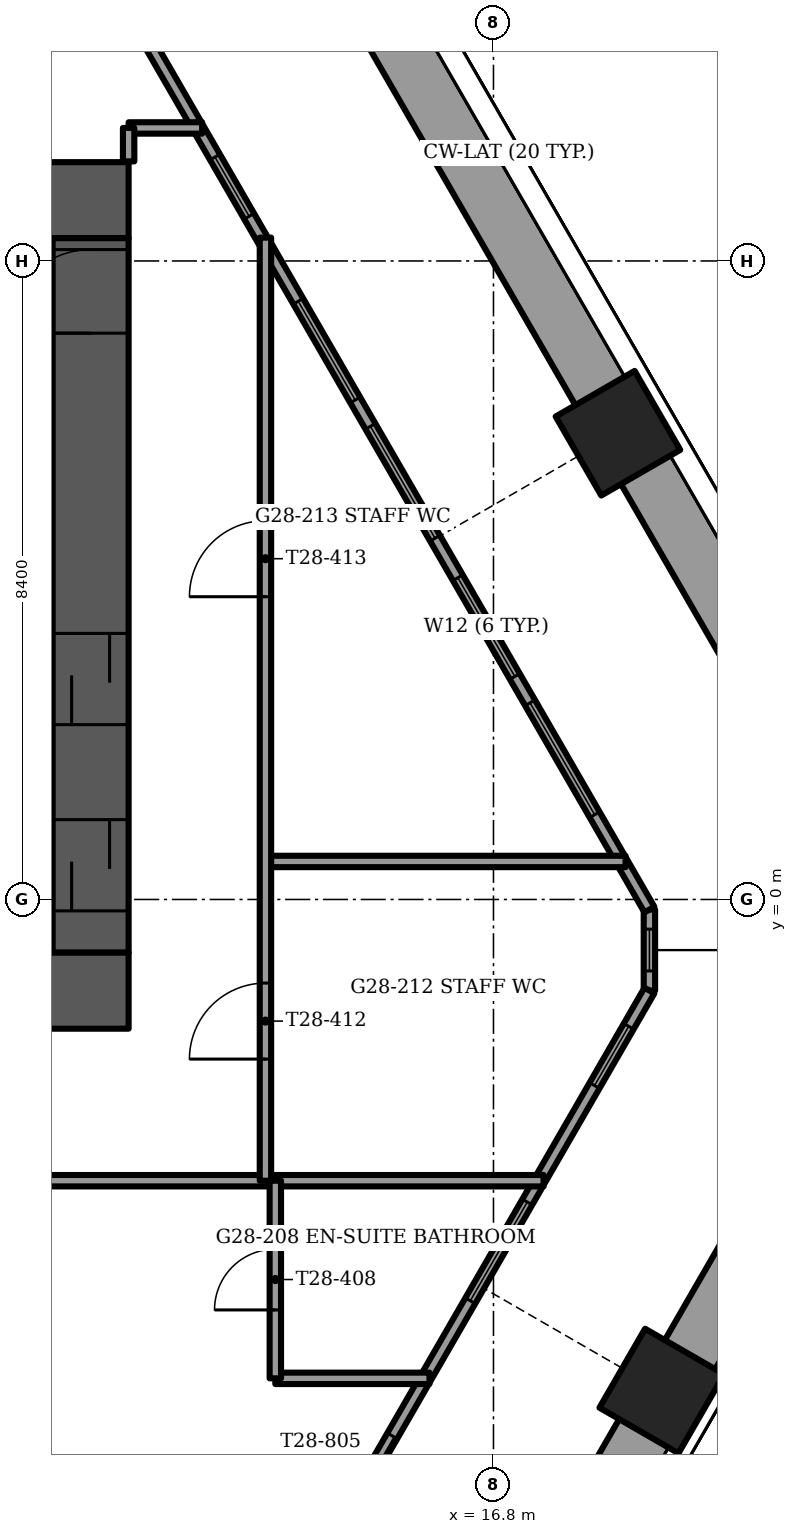
"""IFC4 building model, lengths in metres.
Left out: names, types, materials, properties, quantities, classifications, styles, units other than length and angle.
Written with IfcOpenShell. Run it as: python <this file> out.ifc"""

import sys

from ifc_helpers import new_model, si_unit, direction, frame, frame_2d, origin, origin_2d, place, context, subcontext, project, spatial, rectangle, extrude, element, fill, save


model = new_model("IFC4")
c1 = context("Model", 3, precision=1e-05, world=origin(), true_north=direction((0.0, 1.0)))
c2 = subcontext(c1, "Body", "Model", "MODEL_VIEW")
j1 = project(units=[si_unit("LENGTHUNIT", "METRE"), si_unit("PLANEANGLEUNIT", "RADIAN")], contexts=[c1])
p1 = place(None, origin())
s1 = spatial("IfcSite", under=j1, at=p1, CompositionType="ELEMENT")
p2 = place(p1, origin())
s2 = spatial("IfcBuilding", under=s1, at=p2, CompositionType="ELEMENT")
p3 = place(p2, frame((0.0, 0.0, 116.0)))
s3 = spatial("IfcBuildingStorey", under=s2, at=p3, CompositionType="ELEMENT", Elevation=116.0)
for number, where, z_axis, x_axis in (
    (1, (19.014, -6.467, -1.2), (0.0, 0.0, 1.0), (-0.5, -0.866, 0.0)),
    (2, (18.438, 6.134, -1.2), (0.0, 0.0, 1.0), (0.5, -0.866, 0.0)),
):
    element("IfcColumn", number, at=place(p3, frame(where, z_axis=z_axis, x_axis=x_axis)), inside=s3, PredefinedType="COLUMN", context=c2, shape_type="SweptSolid", body=[
        extrude(rectangle(XDim=1.2, YDim=1.2, at=origin_2d()), origin(), (0.0, 0.0, 1.0), 3.75),
    ])
p4 = place(p3, frame((-12.0, -1.2, -0.3), z_axis=(0.0, 0.0, 1.0), x_axis=(1.0, 0.0, 0.0)))
e3 = element("IfcWall", 3, at=p4, inside=s3, PredefinedType="SHEAR", context=c2, shape_type="SweptSolid", body=[
    extrude(rectangle(XDim=24.0, YDim=1.0, at=frame_2d((12.0, 0.0))), origin(), (0.0, 0.0, 1.0), 3.75),
])
p5 = place(p4, frame((11.2, 0.0, 0.0)))
e4 = element("IfcOpeningElement", 4, at=p5, cuts=e3, PredefinedType="OPENING", context=c2, shape_type="SweptSolid", body=[
    extrude(rectangle(XDim=1.6, YDim=2.1, at=frame_2d((0.8, 1.05))), frame((0.0, 0.5, 0.0), z_axis=(0.0, -1.0, 0.0), x_axis=(1.0, 0.0, 0.0)), (0.0, 0.0, 1.0), 1.0),
])
p6 = place(p3, frame((-12.0, 9.2, -0.3), z_axis=(0.0, 0.0, 1.0), x_axis=(1.0, 0.0, 0.0)))
e5 = element("IfcWall", 5, at=p6, inside=s3, PredefinedType="SHEAR", context=c2, shape_type="SweptSolid", body=[
    extrude(rectangle(XDim=24.0, YDim=1.0, at=frame_2d((12.0, 0.0))), origin(), (0.0, 0.0, 1.0), 3.75),
])
p7 = place(p6, frame((11.2, 0.0, 0.0)))
e6 = element("IfcOpeningElement", 6, at=p7, cuts=e5, PredefinedType="OPENING", context=c2, shape_type="SweptSolid", body=[
    extrude(rectangle(XDim=1.6, YDim=2.1, at=frame_2d((0.8, 1.05))), frame((0.0, 0.5, 0.0), z_axis=(0.0, -1.0, 0.0), x_axis=(1.0, 0.0, 0.0)), (0.0, 0.0, 1.0), 1.0),
])
p8 = place(p6, frame((5.25, 0.0, 0.0)))
e7 = element("IfcOpeningElement", 7, at=p8, cuts=e5, PredefinedType="OPENING", context=c2, shape_type="SweptSolid", body=[
    extrude(rectangle(XDim=1.1, YDim=2.1, at=frame_2d((0.55, 1.05))), frame((0.0, 0.5, 0.0), z_axis=(0.0, -1.0, 0.0), x_axis=(1.0, 0.0, 0.0)), (0.0, 0.0, 1.0), 1.0),
])
p9 = place(p6, frame((17.65, 0.0, 0.0)))
e8 = element("IfcOpeningElement", 8, at=p9, cuts=e5, PredefinedType="OPENING", context=c2, shape_type="SweptSolid", body=[
    extrude(rectangle(XDim=1.1, YDim=2.1, at=frame_2d((0.55, 1.05))), frame((0.0, 0.5, 0.0), z_axis=(0.0, -1.0, 0.0), x_axis=(1.0, 0.0, 0.0)), (0.0, 0.0, 1.0), 1.0),
])
p10 = place(p3, frame((11.5, -0.7, -0.3), z_axis=(0.0, 0.0, 1.0), x_axis=(0.0, 1.0, 0.0)))
e9 = element("IfcWall", 9, at=p10, inside=s3, PredefinedType="SHEAR", context=c2, shape_type="SweptSolid", body=[
    extrude(rectangle(XDim=9.4, YDim=1.0, at=frame_2d((4.7, 0.0))), origin(), (0.0, 0.0, 1.0), 3.75),
])
p11 = place(p10, frame((8.15, 0.0, 0.0)))
e10 = element("IfcOpeningElement", 10, at=p11, cuts=e9, PredefinedType="OPENING", context=c2, shape_type="SweptSolid", body=[
    extrude(rectangle(XDim=1.1, YDim=2.1, at=frame_2d((0.55, 1.05))), frame((0.0, 0.5, 0.0), z_axis=(0.0, -1.0, 0.0), x_axis=(1.0, 0.0, 0.0)), (0.0, 0.0, 1.0), 1.0),
])
p12 = place(p10, frame((0.55, 0.0, 0.0)))
e11 = element("IfcOpeningElement", 11, at=p12, cuts=e9, PredefinedType="OPENING", context=c2, shape_type="SweptSolid", body=[
    extrude(rectangle(XDim=1.2, YDim=2.1, at=frame_2d((0.6, 1.05))), frame((0.0, 0.5, 0.0), z_axis=(0.0, -1.0, 0.0), x_axis=(1.0, 0.0, 0.0)), (0.0, 0.0, 1.0), 1.0),
])
p13 = place(p10, frame((3.0, 0.0, 0.0)))
e12 = element("IfcOpeningElement", 12, at=p13, cuts=e9, PredefinedType="OPENING", context=c2, shape_type="SweptSolid", body=[
    extrude(rectangle(XDim=1.2, YDim=2.1, at=frame_2d((0.6, 1.05))), frame((0.0, 0.5, 0.0), z_axis=(0.0, -1.0, 0.0), x_axis=(1.0, 0.0, 0.0)), (0.0, 0.0, 1.0), 1.0),
])
p14 = place(p3, frame((15.522, -12.815, 0.0), z_axis=(0.0, 0.0, 1.0), x_axis=(0.499999023957, 0.866025967302, 0.0)))
e13 = element("IfcWall", 13, at=p14, inside=s3, PredefinedType="PARAPET", context=c2, shape_type="SweptSolid", body=[
    extrude(rectangle(XDim=6.673, YDim=0.9, at=frame_2d((3.337, 0.0))), origin(), (0.0, 0.0, 1.0), 1.1),
])
p15 = place(p3, frame((19.429, -6.048, 0.0), z_axis=(0.0, 0.0, 1.0), x_axis=(0.49998957009, 0.866031425412, 0.0)))
e14 = element("IfcWall", 14, at=p15, inside=s3, PredefinedType="PARAPET", context=c2, shape_type="SweptSolid", body=[
    extrude(rectangle(XDim=5.564, YDim=0.9, at=frame_2d((2.782, 0.0))), origin(), (0.0, 0.0, 1.0), 1.1),
])
p16 = place(p3, frame((22.211, -0.102, 0.0), z_axis=(0.0, 0.0, 1.0), x_axis=(-0.500012951941, 0.866017925849, 0.0)))
e15 = element("IfcWall", 15, at=p16, inside=s3, PredefinedType="PARAPET", context=c2, shape_type="SweptSolid", body=[
    extrude(rectangle(XDim=6.717, YDim=0.9, at=frame_2d((3.358, 0.0))), origin(), (0.0, 0.0, 1.0), 1.1),
])
p17 = place(p3, frame((18.283, 6.702, 0.0), z_axis=(0.0, 0.0, 1.0), x_axis=(-0.50001062018, 0.866019272134, 0.0)))
e16 = element("IfcWall", 16, at=p17, inside=s3, PredefinedType="PARAPET", context=c2, shape_type="SweptSolid", body=[
    extrude(rectangle(XDim=6.674, YDim=0.9, at=frame_2d((3.337, 0.0))), origin(), (0.0, 0.0, 1.0), 1.1),
])
p18 = place(p3, frame((10.463, -15.727, 0.0), z_axis=(0.0, 0.0, 1.0), x_axis=(0.499992448691, 0.866029763491, 0.0)))
e17 = element("IfcWall", 17, at=p18, inside=s3, PredefinedType="SOLIDWALL", context=c2, shape_type="SweptSolid", body=[
    extrude(rectangle(XDim=16.777, YDim=0.15, at=frame_2d((8.388, 0.0))), origin(), (0.0, 0.0, 1.0), 3.45),
])
p19 = place(p18, frame((2.388, 0.0, 0.15)))
e18 = element("IfcOpeningElement", 18, at=p19, cuts=e17, PredefinedType="OPENING", context=c2, shape_type="SweptSolid", body=[
    extrude(rectangle(XDim=1.7, YDim=2.85, at=frame_2d((0.85, 1.425))), frame((0.0, 0.075, 0.0), z_axis=(0.0, -1.0, 0.0), x_axis=(1.0, 0.0, 0.0)), (0.0, 0.0, 1.0), 0.15),
])
p20 = place(p18, frame((4.488, 0.0, 0.0)))
e19 = element("IfcOpeningElement", 19, at=p20, cuts=e17, PredefinedType="OPENING", context=c2, shape_type="SweptSolid", body=[
    extrude(rectangle(XDim=1.5, YDim=2.4, at=frame_2d((0.75, 1.2))), frame((0.0, 0.075, 0.0), z_axis=(0.0, -1.0, 0.0), x_axis=(1.0, 0.0, 0.0)), (0.0, 0.0, 1.0), 0.15),
])
p21 = place(p18, frame((6.588, 0.0, 0.15)))
e20 = element("IfcOpeningElement", 20, at=p21, cuts=e17, PredefinedType="OPENING", context=c2, shape_type="SweptSolid", body=[
    extrude(rectangle(XDim=1.7, YDim=2.85, at=frame_2d((0.85, 1.425))), frame((0.0, 0.075, 0.0), z_axis=(0.0, -1.0, 0.0), x_axis=(1.0, 0.0, 0.0)), (0.0, 0.0, 1.0), 0.15),
])
p22 = place(p18, frame((8.511, 0.0, 0.0)))
e21 = element("IfcOpeningElement", 21, at=p22, cuts=e17, PredefinedType="OPENING", context=c2, shape_type="SweptSolid", body=[
    extrude(rectangle(XDim=1.5, YDim=2.4, at=frame_2d((0.75, 1.2))), frame((0.0, 0.075, 0.0), z_axis=(0.0, -1.0, 0.0), x_axis=(1.0, 0.0, 0.0)), (0.0, 0.0, 1.0), 0.15),
])
p23 = place(p18, frame((12.063, 0.0, 0.15)))
e22 = element("IfcOpeningElement", 22, at=p23, cuts=e17, PredefinedType="OPENING", context=c2, shape_type="SweptSolid", body=[
    extrude(rectangle(XDim=1.5, YDim=2.85, at=frame_2d((0.75, 1.425))), frame((0.0, 0.075, 0.0), z_axis=(0.0, -1.0, 0.0), x_axis=(1.0, 0.0, 0.0)), (0.0, 0.0, 1.0), 0.15),
])
p24 = place(p18, frame((0.544, 0.0, 0.15)))
e23 = element("IfcOpeningElement", 23, at=p24, cuts=e17, PredefinedType="OPENING", context=c2, shape_type="SweptSolid", body=[
    extrude(rectangle(XDim=0.9, YDim=2.73, at=frame_2d((0.45, 1.365))), frame((0.0, 0.075, 0.0), z_axis=(0.0, -1.0, 0.0), x_axis=(1.0, 0.0, 0.0)), (0.0, 0.0, 1.0), 0.15),
])
p25 = place(p18, frame((15.333, 0.0, 0.15)))
e24 = element("IfcOpeningElement", 24, at=p25, cuts=e17, PredefinedType="OPENING", context=c2, shape_type="SweptSolid", body=[
    extrude(rectangle(XDim=0.9, YDim=2.73, at=frame_2d((0.45, 1.365))), frame((0.0, 0.075, 0.0), z_axis=(0.0, -1.0, 0.0), x_axis=(1.0, 0.0, 0.0)), (0.0, 0.0, 1.0), 0.15),
])
p26 = place(p3, frame((18.852, -0.133, 0.0), z_axis=(0.0, 0.0, 1.0), x_axis=(-0.499994842654, 0.866028381359, 0.0)))
e25 = element("IfcWall", 25, at=p26, inside=s3, PredefinedType="SOLIDWALL", context=c2, shape_type="SweptSolid", body=[
    extrude(rectangle(XDim=21.853, YDim=0.15, at=frame_2d((10.927, 0.0))), origin(), (0.0, 0.0, 1.0), 3.45),
])
p27 = place(p26, frame((1.441, 0.0, 0.15)))
e26 = element("IfcOpeningElement", 26, at=p27, cuts=e25, PredefinedType="OPENING", context=c2, shape_type="SweptSolid", body=[
    extrude(rectangle(XDim=1.7, YDim=2.85, at=frame_2d((0.85, 1.425))), frame((0.0, 0.075, 0.0), z_axis=(0.0, -1.0, 0.0), x_axis=(1.0, 0.0, 0.0)), (0.0, 0.0, 1.0), 0.15),
])
p28 = place(p26, frame((3.541, 0.0, 0.15)))
e27 = element("IfcOpeningElement", 27, at=p28, cuts=e25, PredefinedType="OPENING", context=c2, shape_type="SweptSolid", body=[
    extrude(rectangle(XDim=1.5, YDim=2.85, at=frame_2d((0.75, 1.425))), frame((0.0, 0.075, 0.0), z_axis=(0.0, -1.0, 0.0), x_axis=(1.0, 0.0, 0.0)), (0.0, 0.0, 1.0), 0.15),
])
p29 = place(p26, frame((5.641, 0.0, 0.15)))
e28 = element("IfcOpeningElement", 28, at=p29, cuts=e25, PredefinedType="OPENING", context=c2, shape_type="SweptSolid", body=[
    extrude(rectangle(XDim=1.7, YDim=2.85, at=frame_2d((0.85, 1.425))), frame((0.0, 0.075, 0.0), z_axis=(0.0, -1.0, 0.0), x_axis=(1.0, 0.0, 0.0)), (0.0, 0.0, 1.0), 0.15),
])
p30 = place(p26, frame((7.741, 0.0, 0.15)))
e29 = element("IfcOpeningElement", 29, at=p30, cuts=e25, PredefinedType="OPENING", context=c2, shape_type="SweptSolid", body=[
    extrude(rectangle(XDim=1.5, YDim=2.85, at=frame_2d((0.75, 1.425))), frame((0.0, 0.075, 0.0), z_axis=(0.0, -1.0, 0.0), x_axis=(1.0, 0.0, 0.0)), (0.0, 0.0, 1.0), 0.15),
])
p31 = place(p26, frame((10.531, 0.0, 0.15)))
e30 = element("IfcOpeningElement", 30, at=p31, cuts=e25, PredefinedType="OPENING", context=c2, shape_type="SweptSolid", body=[
    extrude(rectangle(XDim=0.9, YDim=2.85, at=frame_2d((0.45, 1.425))), frame((0.0, 0.075, 0.0), z_axis=(0.0, -1.0, 0.0), x_axis=(1.0, 0.0, 0.0)), (0.0, 0.0, 1.0), 0.15),
])
p32 = place(p26, frame((14.041, 0.0, 0.15)))
e31 = element("IfcOpeningElement", 31, at=p32, cuts=e25, PredefinedType="OPENING", context=c2, shape_type="SweptSolid", body=[
    extrude(rectangle(XDim=0.9, YDim=2.85, at=frame_2d((0.45, 1.425))), frame((0.0, 0.075, 0.0), z_axis=(0.0, -1.0, 0.0), x_axis=(1.0, 0.0, 0.0)), (0.0, 0.0, 1.0), 0.15),
])
p33 = place(p26, frame((19.132, 0.0, 0.15)))
e32 = element("IfcOpeningElement", 32, at=p33, cuts=e25, PredefinedType="OPENING", context=c2, shape_type="SweptSolid", body=[
    extrude(rectangle(XDim=1.7, YDim=2.73, at=frame_2d((0.85, 1.365))), frame((0.0, 0.075, 0.0), z_axis=(0.0, -1.0, 0.0), x_axis=(1.0, 0.0, 0.0)), (0.0, 0.0, 1.0), 0.15),
])
p34 = place(p3, frame((18.852, -1.198, 0.0), z_axis=(0.0, 0.0, 1.0), x_axis=(0.0, 1.0, 0.0)))
e33 = element("IfcWall", 33, at=p34, inside=s3, PredefinedType="SOLIDWALL", context=c2, shape_type="SweptSolid", body=[
    extrude(rectangle(XDim=1.065, YDim=0.15, at=frame_2d((0.532, 0.0))), origin(), (0.0, 0.0, 1.0), 3.45),
])
p35 = place(p34, frame((0.258, 0.0, 0.15)))
e34 = element("IfcOpeningElement", 34, at=p35, cuts=e33, PredefinedType="OPENING", context=c2, shape_type="SweptSolid", body=[
    extrude(rectangle(XDim=0.55, YDim=2.85, at=frame_2d((0.275, 1.425))), frame((0.0, 0.075, 0.0), z_axis=(0.0, -1.0, 0.0), x_axis=(1.0, 0.0, 0.0)), (0.0, 0.0, 1.0), 0.15),
])
p36 = place(p3, frame((13.93, -6.3, 0.0), z_axis=(0.0, 0.0, 1.0), x_axis=(1.0, 0.0, 0.0)))
e35 = element("IfcWall", 35, at=p36, inside=s3, PredefinedType="PARTITIONING", context=c2, shape_type="SweptSolid", body=[
    extrude(rectangle(XDim=2.028, YDim=0.15, at=frame_2d((1.014, 0.0))), origin(), (0.0, 0.0, 1.0), 3.45),
])
p37 = place(p3, frame((9.16, -3.7, 0.0), z_axis=(0.0, 0.0, 1.0), x_axis=(1.0, 0.0, 0.0)))
e36 = element("IfcWall", 36, at=p37, inside=s3, PredefinedType="PARTITIONING", context=c2, shape_type="SweptSolid", body=[
    extrude(rectangle(XDim=8.299, YDim=0.15, at=frame_2d((4.149, 0.0))), origin(), (0.0, 0.0, 1.0), 3.45),
])
p38 = place(p37, frame((0.24, 0.0, 0.0)))
e37 = element("IfcOpeningElement", 37, at=p38, cuts=e36, PredefinedType="OPENING", context=c2, shape_type="SweptSolid", body=[
    extrude(rectangle(XDim=1.0, YDim=2.1, at=frame_2d((0.5, 1.05))), frame((0.0, 0.075, 0.0), z_axis=(0.0, -1.0, 0.0), x_axis=(1.0, 0.0, 0.0)), (0.0, 0.0, 1.0), 0.15),
])
p39 = place(p3, frame((13.8, 0.5, 0.0), z_axis=(0.0, 0.0, 1.0), x_axis=(1.0, 0.0, 0.0)))
e38 = element("IfcWall", 38, at=p39, inside=s3, PredefinedType="PARTITIONING", context=c2, shape_type="SweptSolid", body=[
    extrude(rectangle(XDim=4.738, YDim=0.15, at=frame_2d((2.369, 0.0))), origin(), (0.0, 0.0, 1.0), 3.45),
])
p40 = place(p3, frame((12.0, 10.15, 0.0), z_axis=(0.0, 0.0, 1.0), x_axis=(1.0, 0.0, 0.0)))
e39 = element("IfcWall", 39, at=p40, inside=s3, PredefinedType="PARTITIONING", context=c2, shape_type="SweptSolid", body=[
    extrude(rectangle(XDim=0.967, YDim=0.15, at=frame_2d((0.483, 0.0))), origin(), (0.0, 0.0, 1.0), 3.45),
])
p41 = place(p3, frame((13.93, -6.3, 0.0), z_axis=(0.0, 0.0, 1.0), x_axis=(0.0, 1.0, 0.0)))
e40 = element("IfcWall", 40, at=p41, inside=s3, PredefinedType="PARTITIONING", context=c2, shape_type="SweptSolid", body=[
    extrude(rectangle(XDim=2.6, YDim=0.15, at=frame_2d((1.3, 0.0))), origin(), (0.0, 0.0, 1.0), 3.45),
])
p42 = place(p41, frame((0.9, 0.0, 0.0)))
e41 = element("IfcOpeningElement", 41, at=p42, cuts=e40, PredefinedType="OPENING", context=c2, shape_type="SweptSolid", body=[
    extrude(rectangle(XDim=0.8, YDim=2.1, at=frame_2d((0.4, 1.05))), frame((0.0, 0.075, 0.0), z_axis=(0.0, -1.0, 0.0), x_axis=(1.0, 0.0, 0.0)), (0.0, 0.0, 1.0), 0.15),
])
p43 = place(p3, frame((13.8, -3.7, 0.0), z_axis=(0.0, 0.0, 1.0), x_axis=(0.0, 1.0, 0.0)))
e42 = element("IfcWall", 42, at=p43, inside=s3, PredefinedType="PARTITIONING", context=c2, shape_type="SweptSolid", body=[
    extrude(rectangle(XDim=12.407, YDim=0.15, at=frame_2d((6.204, 0.0))), origin(), (0.0, 0.0, 1.0), 3.45),
])
p44 = place(p43, frame((1.6, 0.0, 0.0)))
e43 = element("IfcOpeningElement", 43, at=p44, cuts=e42, PredefinedType="OPENING", context=c2, shape_type="SweptSolid", body=[
    extrude(rectangle(XDim=1.0, YDim=2.1, at=frame_2d((0.5, 1.05))), frame((0.0, 0.075, 0.0), z_axis=(0.0, -1.0, 0.0), x_axis=(1.0, 0.0, 0.0)), (0.0, 0.0, 1.0), 0.15),
])
p45 = place(p43, frame((7.683, 0.0, 0.0)))
e44 = element("IfcOpeningElement", 44, at=p45, cuts=e42, PredefinedType="OPENING", context=c2, shape_type="SweptSolid", body=[
    extrude(rectangle(XDim=1.0, YDim=2.1, at=frame_2d((0.5, 1.05))), frame((0.0, 0.075, 0.0), z_axis=(0.0, -1.0, 0.0), x_axis=(1.0, 0.0, 0.0)), (0.0, 0.0, 1.0), 0.15),
])
p46 = place(p3, frame((12.0, 9.71, 0.0), z_axis=(0.0, 0.0, 1.0), x_axis=(0.0, 1.0, 0.0)))
e45 = element("IfcWall", 45, at=p46, inside=s3, PredefinedType="PARTITIONING", context=c2, shape_type="SweptSolid", body=[
    extrude(rectangle(XDim=0.44, YDim=0.15, at=frame_2d((0.22, 0.0))), origin(), (0.0, 0.0, 1.0), 3.45),
])
p47 = place(p22, origin())
e46 = element("IfcDoor", 46, at=p47, inside=s3, OperationType="SLIDING_TO_RIGHT", PredefinedType="DOOR", context=c2, shape_type="SweptSolid", body=[
    extrude(rectangle(XDim=1.5, YDim=2.4, at=frame_2d((0.75, 1.2))), frame((0.0, 0.025, 0.0), z_axis=(0.0, -1.0, 0.0), x_axis=(1.0, 0.0, 0.0)), (0.0, 0.0, 1.0), 0.05),
])
fill(e21, e46)
p48 = place(p23, origin())
e47 = element("IfcWindow", 47, at=p48, inside=s3, PartitioningType="SINGLE_PANEL", PredefinedType="WINDOW", context=c2, shape_type="SweptSolid", body=[
    extrude(rectangle(XDim=1.5, YDim=2.85, at=frame_2d((0.75, 1.425))), frame((0.0, 0.03, 0.0), z_axis=(0.0, -1.0, 0.0), x_axis=(1.0, 0.0, 0.0)), (0.0, 0.0, 1.0), 0.06),
])
fill(e22, e47)
p49 = place(p25, origin())
e48 = element("IfcWindow", 48, at=p49, inside=s3, PartitioningType="SINGLE_PANEL", PredefinedType="WINDOW", context=c2, shape_type="SweptSolid", body=[
    extrude(rectangle(XDim=0.9, YDim=2.73, at=frame_2d((0.45, 1.365))), frame((0.0, 0.03, 0.0), z_axis=(0.0, -1.0, 0.0), x_axis=(1.0, 0.0, 0.0)), (0.0, 0.0, 1.0), 0.06),
])
fill(e24, e48)
p50 = place(p27, origin())
e49 = element("IfcWindow", 49, at=p50, inside=s3, PartitioningType="SINGLE_PANEL", PredefinedType="WINDOW", context=c2, shape_type="SweptSolid", body=[
    extrude(rectangle(XDim=1.7, YDim=2.85, at=frame_2d((0.85, 1.425))), frame((0.0, 0.03, 0.0), z_axis=(0.0, -1.0, 0.0), x_axis=(1.0, 0.0, 0.0)), (0.0, 0.0, 1.0), 0.06),
])
fill(e26, e49)
p51 = place(p28, origin())
e50 = element("IfcWindow", 50, at=p51, inside=s3, PartitioningType="SINGLE_PANEL", PredefinedType="WINDOW", context=c2, shape_type="SweptSolid", body=[
    extrude(rectangle(XDim=1.5, YDim=2.85, at=frame_2d((0.75, 1.425))), frame((0.0, 0.03, 0.0), z_axis=(0.0, -1.0, 0.0), x_axis=(1.0, 0.0, 0.0)), (0.0, 0.0, 1.0), 0.06),
])
fill(e27, e50)
p52 = place(p29, origin())
e51 = element("IfcWindow", 51, at=p52, inside=s3, PartitioningType="SINGLE_PANEL", PredefinedType="WINDOW", context=c2, shape_type="SweptSolid", body=[
    extrude(rectangle(XDim=1.7, YDim=2.85, at=frame_2d((0.85, 1.425))), frame((0.0, 0.03, 0.0), z_axis=(0.0, -1.0, 0.0), x_axis=(1.0, 0.0, 0.0)), (0.0, 0.0, 1.0), 0.06),
])
fill(e28, e51)
p53 = place(p30, origin())
e52 = element("IfcWindow", 52, at=p53, inside=s3, PartitioningType="SINGLE_PANEL", PredefinedType="WINDOW", context=c2, shape_type="SweptSolid", body=[
    extrude(rectangle(XDim=1.5, YDim=2.85, at=frame_2d((0.75, 1.425))), frame((0.0, 0.03, 0.0), z_axis=(0.0, -1.0, 0.0), x_axis=(1.0, 0.0, 0.0)), (0.0, 0.0, 1.0), 0.06),
])
fill(e29, e52)
p54 = place(p31, origin())
e53 = element("IfcWindow", 53, at=p54, inside=s3, PartitioningType="SINGLE_PANEL", PredefinedType="WINDOW", context=c2, shape_type="SweptSolid", body=[
    extrude(rectangle(XDim=0.9, YDim=2.85, at=frame_2d((0.45, 1.425))), frame((0.0, 0.03, 0.0), z_axis=(0.0, -1.0, 0.0), x_axis=(1.0, 0.0, 0.0)), (0.0, 0.0, 1.0), 0.06),
])
fill(e30, e53)
p55 = place(p35, origin())
e54 = element("IfcWindow", 54, at=p55, inside=s3, PartitioningType="SINGLE_PANEL", PredefinedType="WINDOW", context=c2, shape_type="SweptSolid", body=[
    extrude(rectangle(XDim=0.55, YDim=2.85, at=frame_2d((0.275, 1.425))), frame((0.0, 0.03, 0.0), z_axis=(0.0, -1.0, 0.0), x_axis=(1.0, 0.0, 0.0)), (0.0, 0.0, 1.0), 0.06),
])
fill(e34, e54)
p56 = place(p11, origin())
e55 = element("IfcDoor", 55, at=p56, inside=s3, OperationType="SINGLE_SWING_RIGHT", PredefinedType="DOOR", context=c2, shape_type="SweptSolid", body=[
    extrude(rectangle(XDim=1.1, YDim=2.1, at=frame_2d((0.55, 1.05))), frame((0.0, 0.025, 0.0), z_axis=(0.0, -1.0, 0.0), x_axis=(1.0, 0.0, 0.0)), (0.0, 0.0, 1.0), 0.05),
])
fill(e10, e55)
p57 = place(p12, origin())
e56 = element("IfcDoor", 56, at=p57, inside=s3, OperationType="SLIDING_TO_LEFT", PredefinedType="DOOR", context=c2, shape_type="SweptSolid", body=[
    extrude(rectangle(XDim=1.2, YDim=2.1, at=frame_2d((0.6, 1.05))), frame((0.0, 0.025, 0.0), z_axis=(0.0, -1.0, 0.0), x_axis=(1.0, 0.0, 0.0)), (0.0, 0.0, 1.0), 0.05),
])
fill(e11, e56)
p58 = place(p13, origin())
e57 = element("IfcDoor", 57, at=p58, inside=s3, OperationType="SLIDING_TO_LEFT", PredefinedType="DOOR", context=c2, shape_type="SweptSolid", body=[
    extrude(rectangle(XDim=1.2, YDim=2.1, at=frame_2d((0.6, 1.05))), frame((0.0, 0.025, 0.0), z_axis=(0.0, -1.0, 0.0), x_axis=(1.0, 0.0, 0.0)), (0.0, 0.0, 1.0), 0.05),
])
fill(e12, e57)
p59 = place(p42, origin())
e58 = element("IfcDoor", 58, at=p59, inside=s3, OperationType="SINGLE_SWING_RIGHT", PredefinedType="DOOR", context=c2, shape_type="SweptSolid", body=[
    extrude(rectangle(XDim=0.8, YDim=2.1, at=frame_2d((0.4, 1.05))), frame((0.0, 0.025, 0.0), z_axis=(0.0, -1.0, 0.0), x_axis=(1.0, 0.0, 0.0)), (0.0, 0.0, 1.0), 0.05),
])
fill(e41, e58)
p60 = place(p44, origin())
e59 = element("IfcDoor", 59, at=p60, inside=s3, OperationType="SINGLE_SWING_LEFT", PredefinedType="DOOR", context=c2, shape_type="SweptSolid", body=[
    extrude(rectangle(XDim=1.0, YDim=2.1, at=frame_2d((0.5, 1.05))), frame((0.0, 0.025, 0.0), z_axis=(0.0, -1.0, 0.0), x_axis=(1.0, 0.0, 0.0)), (0.0, 0.0, 1.0), 0.05),
])
fill(e43, e59)
p61 = place(p45, origin())
e60 = element("IfcDoor", 60, at=p61, inside=s3, OperationType="SINGLE_SWING_LEFT", PredefinedType="DOOR", context=c2, shape_type="SweptSolid", body=[
    extrude(rectangle(XDim=1.0, YDim=2.1, at=frame_2d((0.5, 1.05))), frame((0.0, 0.025, 0.0), z_axis=(0.0, -1.0, 0.0), x_axis=(1.0, 0.0, 0.0)), (0.0, 0.0, 1.0), 0.05),
])
fill(e44, e60)
save(model, sys.argv[1])
